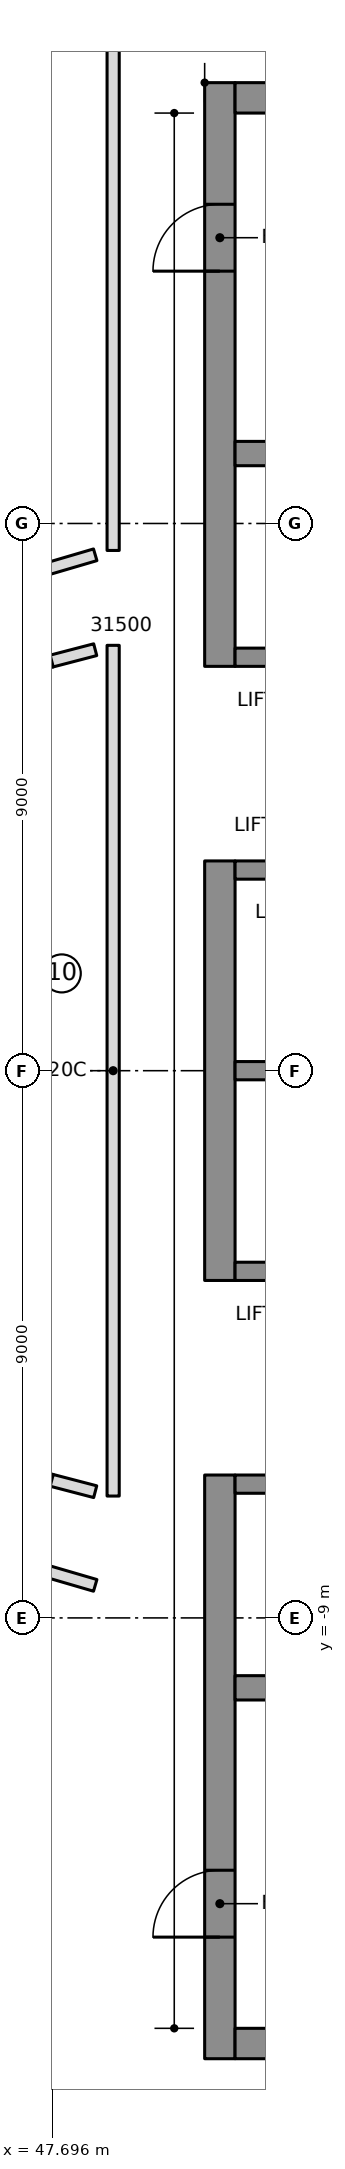
"""IFC4 building model, lengths in metres.
Left out: names, types, materials, properties, quantities, classifications, styles, units other than length and angle.
Written with IfcOpenShell. Run it as: python <this file> out.ifc"""

import sys

from ifc_helpers import new_model, si_unit, direction, frame, frame_2d, origin, place, context, subcontext, project, spatial, rectangle, extrude, element, fill, save


model = new_model("IFC4")
c1 = context("Model", 3, precision=1e-05, world=origin(), true_north=direction((0.0, 1.0)))
c2 = subcontext(c1, "Body", "Model", "MODEL_VIEW")
j1 = project(units=[si_unit("LENGTHUNIT", "METRE"), si_unit("PLANEANGLEUNIT", "RADIAN")], contexts=[c1])
p1 = place(None, origin())
s1 = spatial("IfcSite", under=j1, at=p1, CompositionType="ELEMENT")
p2 = place(p1, origin())
s2 = spatial("IfcBuilding", under=s1, at=p2, CompositionType="ELEMENT")
p3 = place(p2, frame((0.0, 0.0, 275.0)))
s3 = spatial("IfcBuildingStorey", under=s2, at=p3, CompositionType="ELEMENT", Elevation=275.0)
p4 = place(p3, frame((50.45, 6.65, 0.0), z_axis=(0.0, 0.0, 1.0), x_axis=(0.0, 1.0, 0.0)))
e1 = element("IfcWall", 1, at=p4, inside=s3, PredefinedType="SHEAR", context=c2, shape_type="SweptSolid", body=[
    extrude(rectangle(XDim=9.6, YDim=0.5, at=frame_2d((4.8, 0.0))), origin(), (0.0, 0.0, 1.0), 3.55),
])
p5 = place(p4, frame((6.5, 0.0, 0.0)))
e2 = element("IfcOpeningElement", 2, at=p5, cuts=e1, PredefinedType="OPENING", context=c2, shape_type="SweptSolid", body=[
    extrude(rectangle(XDim=1.1, YDim=2.1, at=frame_2d((0.55, 1.05))), frame((0.0, 0.26, 0.0), z_axis=(0.0, -1.0, 0.0), x_axis=(1.0, 0.0, 0.0)), (0.0, 0.0, 1.0), 0.52),
])
p6 = place(p3, frame((50.45, -3.45, 0.0), z_axis=(0.0, 0.0, 1.0), x_axis=(0.0, 1.0, 0.0)))
e3 = element("IfcWall", 3, at=p6, inside=s3, PredefinedType="SHEAR", context=c2, shape_type="SweptSolid", body=[
    extrude(rectangle(XDim=6.9, YDim=0.5, at=frame_2d((3.45, 0.0))), origin(), (0.0, 0.0, 1.0), 3.55),
])
p7 = place(p3, frame((50.45, -16.25, 0.0), z_axis=(0.0, 0.0, 1.0), x_axis=(0.0, 1.0, 0.0)))
e4 = element("IfcWall", 4, at=p7, inside=s3, PredefinedType="SHEAR", context=c2, shape_type="SweptSolid", body=[
    extrude(rectangle(XDim=9.6, YDim=0.5, at=frame_2d((4.8, 0.0))), origin(), (0.0, 0.0, 1.0), 3.55),
])
p8 = place(p7, frame((2.0, 0.0, 0.0)))
e5 = element("IfcOpeningElement", 5, at=p8, cuts=e4, PredefinedType="OPENING", context=c2, shape_type="SweptSolid", body=[
    extrude(rectangle(XDim=1.1, YDim=2.1, at=frame_2d((0.55, 1.05))), frame((0.0, 0.26, 0.0), z_axis=(0.0, -1.0, 0.0), x_axis=(1.0, 0.0, 0.0)), (0.0, 0.0, 1.0), 0.52),
])
for number, where, z_axis, x_axis in (
    (6, (50.7, 16.0, 0.0), (0.0, 0.0, 1.0), (1.0, 0.0, 0.0)),
    (7, (50.7, -16.0, 0.0), (0.0, 0.0, 1.0), (1.0, 0.0, 0.0)),
):
    element("IfcWall", number, at=place(p3, frame(where, z_axis=z_axis, x_axis=x_axis)), inside=s3, PredefinedType="SHEAR", context=c2, shape_type="SweptSolid", body=[
        extrude(rectangle(XDim=13.52, YDim=0.5, at=frame_2d((6.76, 0.0))), origin(), (0.0, 0.0, 1.0), 3.55),
    ])
p9 = place(p3, frame((50.7, 10.15, 0.0), z_axis=(0.0, 0.0, 1.0), x_axis=(1.0, 0.0, 0.0)))
e8 = element("IfcWall", 8, at=p9, inside=s3, PredefinedType="SHEAR", context=c2, shape_type="SweptSolid", body=[
    extrude(rectangle(XDim=13.02, YDim=0.4, at=frame_2d((6.51, 0.0))), origin(), (0.0, 0.0, 1.0), 3.55),
])
p10 = place(p9, frame((0.7, 0.0, 0.0)))
e9 = element("IfcOpeningElement", 9, at=p10, cuts=e8, PredefinedType="OPENING", context=c2, shape_type="SweptSolid", body=[
    extrude(rectangle(XDim=1.1, YDim=2.1, at=frame_2d((0.55, 1.05))), frame((0.0, 0.21, 0.0), z_axis=(0.0, -1.0, 0.0), x_axis=(1.0, 0.0, 0.0)), (0.0, 0.0, 1.0), 0.42),
])
p11 = place(p9, frame((3.5, 0.0, 0.0)))
e10 = element("IfcOpeningElement", 10, at=p11, cuts=e8, PredefinedType="OPENING", context=c2, shape_type="SweptSolid", body=[
    extrude(rectangle(XDim=1.1, YDim=2.1, at=frame_2d((0.55, 1.05))), frame((0.0, 0.21, 0.0), z_axis=(0.0, -1.0, 0.0), x_axis=(1.0, 0.0, 0.0)), (0.0, 0.0, 1.0), 0.42),
])
p12 = place(p3, frame((50.7, -10.15, 0.0), z_axis=(0.0, 0.0, 1.0), x_axis=(1.0, 0.0, 0.0)))
e11 = element("IfcWall", 11, at=p12, inside=s3, PredefinedType="SHEAR", context=c2, shape_type="SweptSolid", body=[
    extrude(rectangle(XDim=13.02, YDim=0.4, at=frame_2d((6.51, 0.0))), origin(), (0.0, 0.0, 1.0), 3.55),
])
p13 = place(p3, frame((50.7, 0.0, 0.0), z_axis=(0.0, 0.0, 1.0), x_axis=(1.0, 0.0, 0.0)))
e12 = element("IfcWall", 12, at=p13, inside=s3, PredefinedType="SHEAR", context=c2, shape_type="SweptSolid", body=[
    extrude(rectangle(XDim=10.9, YDim=0.3, at=frame_2d((5.45, 0.0))), origin(), (0.0, 0.0, 1.0), 3.55),
])
p14 = place(p3, frame((50.7, 3.3, 0.0), z_axis=(0.0, 0.0, 1.0), x_axis=(1.0, 0.0, 0.0)))
e13 = element("IfcWall", 13, at=p14, inside=s3, PredefinedType="SHEAR", context=c2, shape_type="SweptSolid", body=[
    extrude(rectangle(XDim=10.9, YDim=0.3, at=frame_2d((5.45, 0.0))), origin(), (0.0, 0.0, 1.0), 3.55),
])
p15 = place(p14, frame((0.7, 0.0, 0.0)))
e14 = element("IfcOpeningElement", 14, at=p15, cuts=e13, PredefinedType="OPENING", context=c2, shape_type="SweptSolid", body=[
    extrude(rectangle(XDim=1.1, YDim=2.1, at=frame_2d((0.55, 1.05))), frame((0.0, 0.16, 0.0), z_axis=(0.0, -1.0, 0.0), x_axis=(1.0, 0.0, 0.0)), (0.0, 0.0, 1.0), 0.32),
])
p16 = place(p14, frame((3.5, 0.0, 0.0)))
e15 = element("IfcOpeningElement", 15, at=p16, cuts=e13, PredefinedType="OPENING", context=c2, shape_type="SweptSolid", body=[
    extrude(rectangle(XDim=1.1, YDim=2.1, at=frame_2d((0.55, 1.05))), frame((0.0, 0.16, 0.0), z_axis=(0.0, -1.0, 0.0), x_axis=(1.0, 0.0, 0.0)), (0.0, 0.0, 1.0), 0.32),
])
p17 = place(p14, frame((6.4, 0.0, 0.0)))
e16 = element("IfcOpeningElement", 16, at=p17, cuts=e13, PredefinedType="OPENING", context=c2, shape_type="SweptSolid", body=[
    extrude(rectangle(XDim=0.9, YDim=2.1, at=frame_2d((0.45, 1.05))), frame((0.0, 0.16, 0.0), z_axis=(0.0, -1.0, 0.0), x_axis=(1.0, 0.0, 0.0)), (0.0, 0.0, 1.0), 0.32),
])
p18 = place(p14, frame((9.2, 0.0, 0.0)))
e17 = element("IfcOpeningElement", 17, at=p18, cuts=e13, PredefinedType="OPENING", context=c2, shape_type="SweptSolid", body=[
    extrude(rectangle(XDim=0.9, YDim=2.1, at=frame_2d((0.45, 1.05))), frame((0.0, 0.16, 0.0), z_axis=(0.0, -1.0, 0.0), x_axis=(1.0, 0.0, 0.0)), (0.0, 0.0, 1.0), 0.32),
])
p19 = place(p3, frame((50.7, 6.8, 0.0), z_axis=(0.0, 0.0, 1.0), x_axis=(1.0, 0.0, 0.0)))
e18 = element("IfcWall", 18, at=p19, inside=s3, PredefinedType="SHEAR", context=c2, shape_type="SweptSolid", body=[
    extrude(rectangle(XDim=10.9, YDim=0.3, at=frame_2d((5.45, 0.0))), origin(), (0.0, 0.0, 1.0), 3.55),
])
p20 = place(p19, frame((6.4, 0.0, 0.0)))
e19 = element("IfcOpeningElement", 19, at=p20, cuts=e18, PredefinedType="OPENING", context=c2, shape_type="SweptSolid", body=[
    extrude(rectangle(XDim=0.9, YDim=2.1, at=frame_2d((0.45, 1.05))), frame((0.0, 0.16, 0.0), z_axis=(0.0, -1.0, 0.0), x_axis=(1.0, 0.0, 0.0)), (0.0, 0.0, 1.0), 0.32),
])
p21 = place(p19, frame((9.2, 0.0, 0.0)))
e20 = element("IfcOpeningElement", 20, at=p21, cuts=e18, PredefinedType="OPENING", context=c2, shape_type="SweptSolid", body=[
    extrude(rectangle(XDim=0.9, YDim=2.1, at=frame_2d((0.45, 1.05))), frame((0.0, 0.16, 0.0), z_axis=(0.0, -1.0, 0.0), x_axis=(1.0, 0.0, 0.0)), (0.0, 0.0, 1.0), 0.32),
])
p22 = place(p3, frame((50.7, -3.3, 0.0), z_axis=(0.0, 0.0, 1.0), x_axis=(1.0, 0.0, 0.0)))
e21 = element("IfcWall", 21, at=p22, inside=s3, PredefinedType="SHEAR", context=c2, shape_type="SweptSolid", body=[
    extrude(rectangle(XDim=10.9, YDim=0.3, at=frame_2d((5.45, 0.0))), origin(), (0.0, 0.0, 1.0), 3.55),
])
p23 = place(p22, frame((9.1, 0.0, 0.0)))
e22 = element("IfcOpeningElement", 22, at=p23, cuts=e21, PredefinedType="OPENING", context=c2, shape_type="SweptSolid", body=[
    extrude(rectangle(XDim=1.1, YDim=2.1, at=frame_2d((0.55, 1.05))), frame((0.0, 0.16, 0.0), z_axis=(0.0, -1.0, 0.0), x_axis=(1.0, 0.0, 0.0)), (0.0, 0.0, 1.0), 0.32),
])
p24 = place(p3, frame((50.7, -6.8, 0.0), z_axis=(0.0, 0.0, 1.0), x_axis=(1.0, 0.0, 0.0)))
e23 = element("IfcWall", 23, at=p24, inside=s3, PredefinedType="SHEAR", context=c2, shape_type="SweptSolid", body=[
    extrude(rectangle(XDim=10.9, YDim=0.3, at=frame_2d((5.45, 0.0))), origin(), (0.0, 0.0, 1.0), 3.55),
])
p25 = place(p24, frame((6.3, 0.0, 0.0)))
e24 = element("IfcOpeningElement", 24, at=p25, cuts=e23, PredefinedType="OPENING", context=c2, shape_type="SweptSolid", body=[
    extrude(rectangle(XDim=1.1, YDim=2.1, at=frame_2d((0.55, 1.05))), frame((0.0, 0.16, 0.0), z_axis=(0.0, -1.0, 0.0), x_axis=(1.0, 0.0, 0.0)), (0.0, 0.0, 1.0), 0.32),
])
p26 = place(p24, frame((9.1, 0.0, 0.0)))
e25 = element("IfcOpeningElement", 25, at=p26, cuts=e23, PredefinedType="OPENING", context=c2, shape_type="SweptSolid", body=[
    extrude(rectangle(XDim=1.1, YDim=2.1, at=frame_2d((0.55, 1.05))), frame((0.0, 0.16, 0.0), z_axis=(0.0, -1.0, 0.0), x_axis=(1.0, 0.0, 0.0)), (0.0, 0.0, 1.0), 0.32),
])
p27 = place(p24, frame((0.8, 0.0, 0.0)))
e26 = element("IfcOpeningElement", 26, at=p27, cuts=e23, PredefinedType="OPENING", context=c2, shape_type="SweptSolid", body=[
    extrude(rectangle(XDim=0.9, YDim=2.1, at=frame_2d((0.45, 1.05))), frame((0.0, 0.16, 0.0), z_axis=(0.0, -1.0, 0.0), x_axis=(1.0, 0.0, 0.0)), (0.0, 0.0, 1.0), 0.32),
])
p28 = place(p24, frame((3.6, 0.0, 0.0)))
e27 = element("IfcOpeningElement", 27, at=p28, cuts=e23, PredefinedType="OPENING", context=c2, shape_type="SweptSolid", body=[
    extrude(rectangle(XDim=0.9, YDim=2.1, at=frame_2d((0.45, 1.05))), frame((0.0, 0.16, 0.0), z_axis=(0.0, -1.0, 0.0), x_axis=(1.0, 0.0, 0.0)), (0.0, 0.0, 1.0), 0.32),
])
p29 = place(p3, frame((43.918, 5.675, 0.0), z_axis=(0.0, 0.0, 1.0), x_axis=(0.962411212211, 0.271596499628, 0.0)))
e28 = element("IfcWall", 28, at=p29, inside=s3, PredefinedType="PARTITIONING", context=c2, shape_type="SweptSolid", body=[
    extrude(rectangle(XDim=3.913, YDim=0.2, at=frame_2d((1.957, 0.0))), origin(), (0.0, 0.0, 1.0), 3.25),
])
p30 = place(p29, frame((1.457, 0.0, 0.0)))
e29 = element("IfcOpeningElement", 29, at=p30, cuts=e28, PredefinedType="OPENING", context=c2, shape_type="SweptSolid", body=[
    extrude(rectangle(XDim=1.0, YDim=2.1, at=frame_2d((0.5, 1.05))), frame((0.0, 0.11, 0.0), z_axis=(0.0, -1.0, 0.0), x_axis=(1.0, 0.0, 0.0)), (0.0, 0.0, 1.0), 0.22),
])
p31 = place(p3, frame((47.684, -6.738, 0.0), z_axis=(0.0, 0.0, 1.0), x_axis=(-0.962411212211, 0.271596499628, 0.0)))
e30 = element("IfcWall", 30, at=p31, inside=s3, PredefinedType="PARTITIONING", context=c2, shape_type="SweptSolid", body=[
    extrude(rectangle(XDim=3.913, YDim=0.2, at=frame_2d((1.957, 0.0))), origin(), (0.0, 0.0, 1.0), 3.25),
])
p32 = place(p3, frame((48.4, 8.485, 0.0), z_axis=(0.0, 0.0, 1.0), x_axis=(-0.959461783262, -0.281838759682, 0.0)))
e31 = element("IfcWall", 31, at=p32, inside=s3, PredefinedType="PARTITIONING", context=c2, shape_type="SweptSolid", body=[
    extrude(rectangle(XDim=10.694, YDim=0.2, at=frame_2d((5.347, 0.0))), origin(), (0.0, 0.0, 1.0), 3.25),
])
p33 = place(p32, frame((4.847, 0.0, 0.0)))
e32 = element("IfcOpeningElement", 32, at=p33, cuts=e31, PredefinedType="OPENING", context=c2, shape_type="SweptSolid", body=[
    extrude(rectangle(XDim=1.0, YDim=2.1, at=frame_2d((0.5, 1.05))), frame((0.0, 0.11, 0.0), z_axis=(0.0, -1.0, 0.0), x_axis=(1.0, 0.0, 0.0)), (0.0, 0.0, 1.0), 0.22),
])
p34 = place(p3, frame((38.14, -5.471, 0.0), z_axis=(0.0, 0.0, 1.0), x_axis=(0.95996673497, -0.280114026339, 0.0)))
e33 = element("IfcWall", 33, at=p34, inside=s3, PredefinedType="PARTITIONING", context=c2, shape_type="SweptSolid", body=[
    extrude(rectangle(XDim=10.688, YDim=0.2, at=frame_2d((5.344, 0.0))), origin(), (0.0, 0.0, 1.0), 3.25),
])
p35 = place(p34, frame((3.7, 0.0, 0.0)))
e34 = element("IfcOpeningElement", 34, at=p35, cuts=e33, PredefinedType="OPENING", context=c2, shape_type="SweptSolid", body=[
    extrude(rectangle(XDim=1.0, YDim=2.1, at=frame_2d((0.5, 1.05))), frame((0.0, 0.11, 0.0), z_axis=(0.0, -1.0, 0.0), x_axis=(1.0, 0.0, 0.0)), (0.0, 0.0, 1.0), 0.22),
])
for number, where, z_axis, x_axis in (
    (35, (47.684, 6.738, 0.0), (0.0, 0.0, 1.0), (0.968, 0.253, 0.0)),
    (36, (48.4, -6.924, 0.0), (0.0, 0.0, 1.0), (-0.968, 0.253, 0.0)),
):
    element("IfcWall", number, at=place(p3, frame(where, z_axis=z_axis, x_axis=x_axis)), inside=s3, PredefinedType="PARTITIONING", context=c2, shape_type="SweptSolid", body=[
        extrude(rectangle(XDim=0.74, YDim=0.2, at=frame_2d((0.37, 0.0))), origin(), (0.0, 0.0, 1.0), 3.25),
    ])
p36 = place(p3, frame((48.695, 6.996, 0.0), z_axis=(0.0, 0.0, 1.0), x_axis=(0.0, -1.0, 0.0)))
e37 = element("IfcWall", 37, at=p36, inside=s3, PredefinedType="PARTITIONING", context=c2, shape_type="SweptSolid", body=[
    extrude(rectangle(XDim=13.992, YDim=0.2, at=frame_2d((6.996, 0.0))), origin(), (0.0, 0.0, 1.0), 3.25),
])
p37 = place(p3, frame((48.695, 18.553, 0.0), z_axis=(0.0, 0.0, 1.0), x_axis=(0.0, -1.0, 0.0)))
e38 = element("IfcWall", 38, at=p37, inside=s3, PredefinedType="PARTITIONING", context=c2, shape_type="SweptSolid", body=[
    extrude(rectangle(XDim=9.997, YDim=0.2, at=frame_2d((4.998, 0.0))), origin(), (0.0, 0.0, 1.0), 3.25),
])
p38 = place(p5, origin())
e39 = element("IfcDoor", 39, at=p38, inside=s3, OperationType="SINGLE_SWING_RIGHT", PredefinedType="DOOR", context=c2, shape_type="SweptSolid", body=[
    extrude(rectangle(XDim=1.1, YDim=2.1, at=frame_2d((0.55, 1.05))), frame((0.0, 0.025, 0.0), z_axis=(0.0, -1.0, 0.0), x_axis=(1.0, 0.0, 0.0)), (0.0, 0.0, 1.0), 0.05),
])
fill(e2, e39)
p39 = place(p8, origin())
e40 = element("IfcDoor", 40, at=p39, inside=s3, OperationType="SINGLE_SWING_RIGHT", PredefinedType="DOOR", context=c2, shape_type="SweptSolid", body=[
    extrude(rectangle(XDim=1.1, YDim=2.1, at=frame_2d((0.55, 1.05))), frame((0.0, 0.025, 0.0), z_axis=(0.0, -1.0, 0.0), x_axis=(1.0, 0.0, 0.0)), (0.0, 0.0, 1.0), 0.05),
])
fill(e5, e40)
save(model, sys.argv[1])
